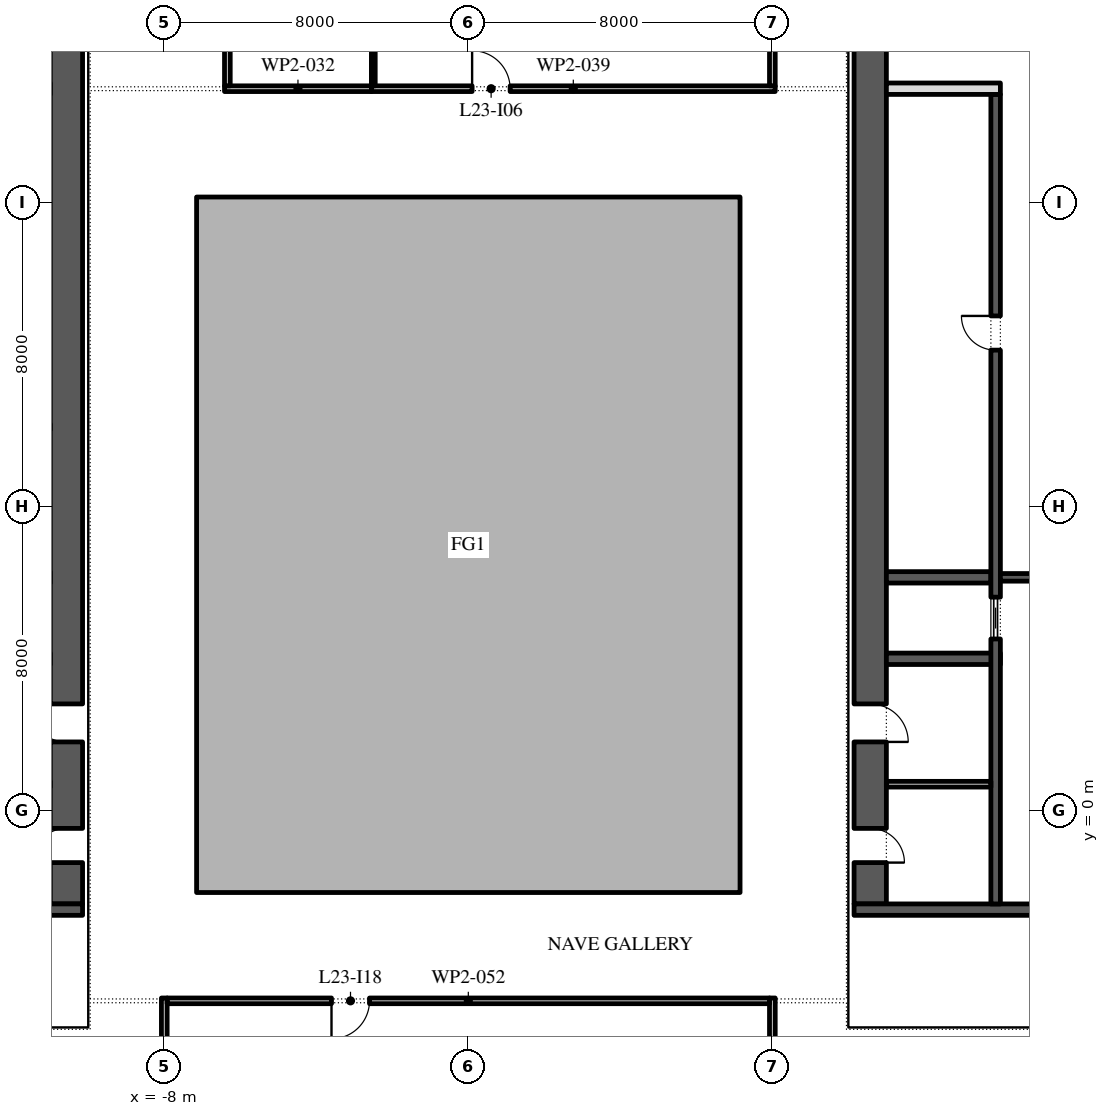
"""IFC4 building model, lengths in metres.
Left out: names, types, materials, properties, quantities, classifications, styles, units other than length and angle.
Written with IfcOpenShell. Run it as: python <this file> out.ifc"""

import sys

from ifc_helpers import new_model, si_unit, direction, frame, frame_2d, origin, place, context, subcontext, project, spatial, polyline, rectangle, outline, extrude, element, fill, save


model = new_model("IFC4")
c1 = context("Model", 3, precision=1e-05, world=origin(), true_north=direction((0.0, 1.0)))
c2 = subcontext(c1, "Body", "Model", "MODEL_VIEW")
j1 = project(units=[si_unit("LENGTHUNIT", "METRE"), si_unit("PLANEANGLEUNIT", "RADIAN")], contexts=[c1])
p1 = place(None, origin())
s1 = spatial("IfcSite", under=j1, at=p1, CompositionType="ELEMENT")
p2 = place(p1, origin())
s2 = spatial("IfcBuilding", under=s1, at=p2, CompositionType="ELEMENT")
p3 = place(p2, frame((0.0, 0.0, 109.8)))
s3 = spatial("IfcBuildingStorey", under=s2, at=p3, CompositionType="ELEMENT", Elevation=109.8)
p4 = place(p3, origin())
e1 = element("IfcWall", 1, at=p4, inside=s3, PredefinedType="STANDARD", context=c2, shape_type="SweptSolid", body=[
    extrude(outline(polyline([(-7.15, -2.15), (7.15, -2.15), (7.15, 16.15), (-7.15, 16.15), (-7.15, -2.15)]), holes=[polyline([(-7.0, -2.0), (-7.0, 16.0), (7.0, 16.0), (7.0, -2.0), (-7.0, -2.0)])]), origin(), (0.0, 0.0, 1.0), 4.0),
])
p5 = place(p3, frame((-10.575, -2.45, 0.0), z_axis=(0.0, 0.0, 1.0), x_axis=(0.0, 1.0, 0.0)))
e2 = element("IfcWall", 2, at=p5, inside=s3, PredefinedType="SHEAR", context=c2, shape_type="SweptSolid", body=[
    extrude(rectangle(XDim=27.9, YDim=0.85, at=frame_2d((13.95, 0.0))), origin(), (0.0, 0.0, 1.0), 4.0),
])
p6 = place(p5, frame((23.65, 0.0, 0.0)))
e3 = element("IfcOpeningElement", 3, at=p6, cuts=e2, PredefinedType="OPENING", context=c2, shape_type="SweptSolid", body=[
    extrude(rectangle(XDim=2.4, YDim=2.1, at=frame_2d((1.2, 1.05))), frame((0.0, 0.435, 0.0), z_axis=(0.0, -1.0, 0.0), x_axis=(1.0, 0.0, 0.0)), (0.0, 0.0, 1.0), 0.87),
])
p7 = place(p5, frame((1.087, 0.0, 0.0)))
e4 = element("IfcOpeningElement", 4, at=p7, cuts=e2, PredefinedType="OPENING", context=c2, shape_type="SweptSolid", body=[
    extrude(rectangle(XDim=0.9, YDim=2.1, at=frame_2d((0.45, 1.05))), frame((0.0, 0.435, 0.0), z_axis=(0.0, -1.0, 0.0), x_axis=(1.0, 0.0, 0.0)), (0.0, 0.0, 1.0), 0.87),
])
p8 = place(p5, frame((4.262, 0.0, 0.0)))
e5 = element("IfcOpeningElement", 5, at=p8, cuts=e2, PredefinedType="OPENING", context=c2, shape_type="SweptSolid", body=[
    extrude(rectangle(XDim=1.0, YDim=2.1, at=frame_2d((0.5, 1.05))), frame((0.0, 0.435, 0.0), z_axis=(0.0, -1.0, 0.0), x_axis=(1.0, 0.0, 0.0)), (0.0, 0.0, 1.0), 0.87),
])
p9 = place(p3, frame((-21.85, -2.6, 0.0), z_axis=(0.0, 0.0, 1.0), x_axis=(1.0, 0.0, 0.0)))
e6 = element("IfcWall", 6, at=p9, inside=s3, PredefinedType="SHEAR", context=c2, shape_type="SweptSolid", body=[
    extrude(rectangle(XDim=11.7, YDim=0.3, at=frame_2d((5.85, 0.0))), origin(), (0.0, 0.0, 1.0), 4.0),
])
p10 = place(p3, frame((10.575, -2.45, 0.0), z_axis=(0.0, 0.0, 1.0), x_axis=(0.0, 1.0, 0.0)))
e7 = element("IfcWall", 7, at=p10, inside=s3, PredefinedType="SHEAR", context=c2, shape_type="SweptSolid", body=[
    extrude(rectangle(XDim=27.9, YDim=0.85, at=frame_2d((13.95, 0.0))), origin(), (0.0, 0.0, 1.0), 4.0),
])
p11 = place(p10, frame((23.65, 0.0, 0.0)))
e8 = element("IfcOpeningElement", 8, at=p11, cuts=e7, PredefinedType="OPENING", context=c2, shape_type="SweptSolid", body=[
    extrude(rectangle(XDim=2.4, YDim=2.1, at=frame_2d((1.2, 1.05))), frame((0.0, 0.435, 0.0), z_axis=(0.0, -1.0, 0.0), x_axis=(1.0, 0.0, 0.0)), (0.0, 0.0, 1.0), 0.87),
])
p12 = place(p10, frame((1.087, 0.0, 0.0)))
e9 = element("IfcOpeningElement", 9, at=p12, cuts=e7, PredefinedType="OPENING", context=c2, shape_type="SweptSolid", body=[
    extrude(rectangle(XDim=0.9, YDim=2.1, at=frame_2d((0.45, 1.05))), frame((0.0, 0.435, 0.0), z_axis=(0.0, -1.0, 0.0), x_axis=(1.0, 0.0, 0.0)), (0.0, 0.0, 1.0), 0.87),
])
p13 = place(p10, frame((4.262, 0.0, 0.0)))
e10 = element("IfcOpeningElement", 10, at=p13, cuts=e7, PredefinedType="OPENING", context=c2, shape_type="SweptSolid", body=[
    extrude(rectangle(XDim=1.0, YDim=2.1, at=frame_2d((0.5, 1.05))), frame((0.0, 0.435, 0.0), z_axis=(0.0, -1.0, 0.0), x_axis=(1.0, 0.0, 0.0)), (0.0, 0.0, 1.0), 0.87),
])
p14 = place(p3, frame((10.15, -2.6, 0.0), z_axis=(0.0, 0.0, 1.0), x_axis=(1.0, 0.0, 0.0)))
e11 = element("IfcWall", 11, at=p14, inside=s3, PredefinedType="SHEAR", context=c2, shape_type="SweptSolid", body=[
    extrude(rectangle(XDim=11.7, YDim=0.3, at=frame_2d((5.85, 0.0))), origin(), (0.0, 0.0, 1.0), 4.0),
])
p15 = place(p3, frame((11.0, 4.0, 0.0), z_axis=(0.0, 0.0, 1.0), x_axis=(1.0, 0.0, 0.0)))
e12 = element("IfcWall", 12, at=p15, inside=s3, PredefinedType="SHEAR", context=c2, shape_type="SweptSolid", body=[
    extrude(rectangle(XDim=3.0, YDim=0.3, at=frame_2d((1.5, 0.0))), origin(), (0.0, 0.0, 1.0), 4.0),
])
p16 = place(p3, frame((11.0, 6.143, 0.0), z_axis=(0.0, 0.0, 1.0), x_axis=(1.0, 0.0, 0.0)))
e13 = element("IfcWall", 13, at=p16, inside=s3, PredefinedType="SHEAR", context=c2, shape_type="SweptSolid", body=[
    extrude(rectangle(XDim=2.75, YDim=0.3, at=frame_2d((1.375, 0.0))), origin(), (0.0, 0.0, 1.0), 4.0),
])
p17 = place(p3, frame((13.875, -2.45, 0.0), z_axis=(0.0, 0.0, 1.0), x_axis=(0.0, 1.0, 0.0)))
e14 = element("IfcWall", 14, at=p17, inside=s3, PredefinedType="SHEAR", context=c2, shape_type="SweptSolid", body=[
    extrude(rectangle(XDim=21.3, YDim=0.25, at=frame_2d((10.65, 0.0))), origin(), (0.0, 0.0, 1.0), 4.0),
])
p18 = place(p17, frame((14.571, 0.0, 0.0)))
e15 = element("IfcOpeningElement", 15, at=p18, cuts=e14, PredefinedType="OPENING", context=c2, shape_type="SweptSolid", body=[
    extrude(rectangle(XDim=0.9, YDim=2.1, at=frame_2d((0.45, 1.05))), frame((0.0, 0.135, 0.0), z_axis=(0.0, -1.0, 0.0), x_axis=(1.0, 0.0, 0.0)), (0.0, 0.0, 1.0), 0.27),
])
p19 = place(p17, frame((6.971, 0.0, 0.0)))
e16 = element("IfcOpeningElement", 16, at=p19, cuts=e14, PredefinedType="OPENING", context=c2, shape_type="SweptSolid", body=[
    extrude(rectangle(XDim=1.1, YDim=2.1, at=frame_2d((0.55, 1.05))), frame((0.0, 0.135, 0.0), z_axis=(0.0, -1.0, 0.0), x_axis=(1.0, 0.0, 0.0)), (0.0, 0.0, 1.0), 0.27),
])
p20 = place(p3, frame((11.0, 19.0, 0.0), z_axis=(0.0, 0.0, 1.0), x_axis=(1.0, 0.0, 0.0)))
e17 = element("IfcWall", 17, at=p20, inside=s3, PredefinedType="PARTITIONING", context=c2, shape_type="SweptSolid", body=[
    extrude(rectangle(XDim=3.0, YDim=0.3, at=frame_2d((1.5, 0.0))), origin(), (0.0, 0.0, 1.0), 4.0),
])
p21 = place(p3, frame((14.0, 6.143, 0.0), z_axis=(0.0, 0.0, 1.0), x_axis=(1.0, 0.0, 0.0)))
e18 = element("IfcWall", 18, at=p21, inside=s3, PredefinedType="SHEAR", context=c2, shape_type="SweptSolid", body=[
    extrude(rectangle(XDim=4.0, YDim=0.2, at=frame_2d((2.0, 0.0))), origin(), (0.0, 0.0, 1.0), 4.0),
])
p22 = place(p21, frame((1.4, 0.0, 0.0)))
e19 = element("IfcOpeningElement", 19, at=p22, cuts=e18, PredefinedType="OPENING", context=c2, shape_type="SweptSolid", body=[
    extrude(rectangle(XDim=1.2, YDim=2.1, at=frame_2d((0.6, 1.05))), frame((0.0, 0.11, 0.0), z_axis=(0.0, -1.0, 0.0), x_axis=(1.0, 0.0, 0.0)), (0.0, 0.0, 1.0), 0.22),
])
p23 = place(p3, frame((11.0, 0.7, 0.0), z_axis=(0.0, 0.0, 1.0), x_axis=(1.0, 0.0, 0.0)))
e20 = element("IfcWall", 20, at=p23, inside=s3, PredefinedType="PARTITIONING", context=c2, shape_type="SweptSolid", body=[
    extrude(rectangle(XDim=2.75, YDim=0.15, at=frame_2d((1.375, 0.0))), origin(), (0.0, 0.0, 1.0), 4.0),
])
p24 = place(p3, frame((-8.0, -4.925, 0.0), z_axis=(0.0, 0.0, 1.0), x_axis=(0.0, -1.0, 0.0)))
e21 = element("IfcWall", 21, at=p24, inside=s3, PredefinedType="PARTITIONING", context=c2, shape_type="SweptSolid", body=[
    extrude(rectangle(XDim=2.7, YDim=0.15, at=frame_2d((1.35, 0.0))), origin(), (0.0, 0.0, 1.0), 4.0),
])
p25 = place(p3, frame((-6.415, 19.0, 0.0), z_axis=(0.0, 0.0, 1.0), x_axis=(1.0, 0.0, 0.0)))
e22 = element("IfcWall", 22, at=p25, inside=s3, PredefinedType="PARTITIONING", context=c2, shape_type="SweptSolid", body=[
    extrude(rectangle(XDim=3.865, YDim=0.15, at=frame_2d((1.933, 0.0))), origin(), (0.0, 0.0, 1.0), 4.0),
])
p26 = place(p3, frame((-6.34, 25.05, 0.0), z_axis=(0.0, 0.0, 1.0), x_axis=(0.0, -1.0, 0.0)))
e23 = element("IfcWall", 23, at=p26, inside=s3, PredefinedType="PARTITIONING", context=c2, shape_type="SweptSolid", body=[
    extrude(rectangle(XDim=5.975, YDim=0.15, at=frame_2d((2.988, 0.0))), origin(), (0.0, 0.0, 1.0), 4.0),
])
p27 = place(p26, frame((2.65, 0.0, 0.0)))
e24 = element("IfcOpeningElement", 24, at=p27, cuts=e23, PredefinedType="OPENING", context=c2, shape_type="SweptSolid", body=[
    extrude(rectangle(XDim=1.0, YDim=2.1, at=frame_2d((0.5, 1.05))), frame((0.0, 0.085, 0.0), z_axis=(0.0, -1.0, 0.0), x_axis=(1.0, 0.0, 0.0)), (0.0, 0.0, 1.0), 0.17),
])
p28 = place(p3, frame((-2.55, 19.0, 0.0), z_axis=(0.0, 0.0, 1.0), x_axis=(1.0, 0.0, 0.0)))
e25 = element("IfcWall", 25, at=p28, inside=s3, PredefinedType="PARTITIONING", context=c2, shape_type="SweptSolid", body=[
    extrude(rectangle(XDim=10.625, YDim=0.15, at=frame_2d((5.312, 0.0))), origin(), (0.0, 0.0, 1.0), 4.0),
])
p29 = place(p28, frame((2.65, 0.0, 0.0)))
e26 = element("IfcOpeningElement", 26, at=p29, cuts=e25, PredefinedType="OPENING", context=c2, shape_type="SweptSolid", body=[
    extrude(rectangle(XDim=1.0, YDim=2.1, at=frame_2d((0.5, 1.05))), frame((0.0, 0.085, 0.0), z_axis=(0.0, -1.0, 0.0), x_axis=(1.0, 0.0, 0.0)), (0.0, 0.0, 1.0), 0.17),
])
p30 = place(p3, frame((-2.5, 24.95, 0.0), z_axis=(0.0, 0.0, 1.0), x_axis=(0.0, -1.0, 0.0)))
e27 = element("IfcWall", 27, at=p30, inside=s3, PredefinedType="PARTITIONING", context=c2, shape_type="SweptSolid", body=[
    extrude(rectangle(XDim=5.875, YDim=0.1, at=frame_2d((2.938, 0.0))), origin(), (0.0, 0.0, 1.0), 4.0),
])
p31 = place(p3, frame((8.0, -7.775, 0.0), z_axis=(0.0, 0.0, 1.0), x_axis=(0.0, 1.0, 0.0)))
e28 = element("IfcWall", 28, at=p31, inside=s3, PredefinedType="PARTITIONING", context=c2, shape_type="SweptSolid", body=[
    extrude(rectangle(XDim=2.85, YDim=0.15, at=frame_2d((1.425, 0.0))), origin(), (0.0, 0.0, 1.0), 4.0),
])
p32 = place(p3, frame((7.925, -5.0, 0.0), z_axis=(0.0, 0.0, 1.0), x_axis=(-1.0, 0.0, 0.0)))
e29 = element("IfcWall", 29, at=p32, inside=s3, PredefinedType="PARTITIONING", context=c2, shape_type="SweptSolid", body=[
    extrude(rectangle(XDim=15.85, YDim=0.15, at=frame_2d((7.925, 0.0))), origin(), (0.0, 0.0, 1.0), 4.0),
])
p33 = place(p32, frame((10.525, 0.0, 0.0)))
e30 = element("IfcOpeningElement", 30, at=p33, cuts=e29, PredefinedType="OPENING", context=c2, shape_type="SweptSolid", body=[
    extrude(rectangle(XDim=1.0, YDim=2.1, at=frame_2d((0.5, 1.05))), frame((0.0, 0.085, 0.0), z_axis=(0.0, -1.0, 0.0), x_axis=(1.0, 0.0, 0.0)), (0.0, 0.0, 1.0), 0.17),
])
p34 = place(p3, frame((8.0, 19.075, 0.0), z_axis=(0.0, 0.0, 1.0), x_axis=(0.0, 1.0, 0.0)))
e31 = element("IfcWall", 31, at=p34, inside=s3, PredefinedType="PARTITIONING", context=c2, shape_type="SweptSolid", body=[
    extrude(rectangle(XDim=5.875, YDim=0.15, at=frame_2d((2.938, 0.0))), origin(), (0.0, 0.0, 1.0), 4.0),
])
p35 = place(p7, origin())
e32 = element("IfcDoor", 32, at=p35, inside=s3, OperationType="SINGLE_SWING_RIGHT", PredefinedType="DOOR", context=c2, shape_type="SweptSolid", body=[
    extrude(rectangle(XDim=0.9, YDim=2.1, at=frame_2d((0.45, 1.05))), frame((0.0, 0.425, 0.0), z_axis=(0.0, -1.0, 0.0), x_axis=(1.0, 0.0, 0.0)), (0.0, 0.0, 1.0), 0.05),
])
fill(e4, e32)
p36 = place(p8, origin())
e33 = element("IfcDoor", 33, at=p36, inside=s3, OperationType="SINGLE_SWING_LEFT", PredefinedType="DOOR", context=c2, shape_type="SweptSolid", body=[
    extrude(rectangle(XDim=1.0, YDim=2.1, at=frame_2d((0.5, 1.05))), frame((0.0, 0.425, 0.0), z_axis=(0.0, -1.0, 0.0), x_axis=(1.0, 0.0, 0.0)), (0.0, 0.0, 1.0), 0.05),
])
fill(e5, e33)
p37 = place(p18, origin())
e34 = element("IfcDoor", 34, at=p37, inside=s3, OperationType="SINGLE_SWING_LEFT", PredefinedType="DOOR", context=c2, shape_type="SweptSolid", body=[
    extrude(rectangle(XDim=0.9, YDim=2.1, at=frame_2d((0.45, 1.05))), frame((0.0, 0.125, 0.0), z_axis=(0.0, -1.0, 0.0), x_axis=(1.0, 0.0, 0.0)), (0.0, 0.0, 1.0), 0.05),
])
fill(e15, e34)
p38 = place(p19, origin())
e35 = element("IfcDoor", 35, at=p38, inside=s3, OperationType="SLIDING_TO_LEFT", PredefinedType="DOOR", context=c2, shape_type="SweptSolid", body=[
    extrude(rectangle(XDim=1.1, YDim=2.1, at=frame_2d((0.55, 1.05))), frame((0.0, 0.025, 0.0), z_axis=(0.0, -1.0, 0.0), x_axis=(1.0, 0.0, 0.0)), (0.0, 0.0, 1.0), 0.05),
])
fill(e16, e35)
p39 = place(p12, frame((0.9, -0.8, 0.0), z_axis=(0.0, 0.0, 1.0), x_axis=(-1.0, 0.0, 0.0)))
e36 = element("IfcDoor", 36, at=p39, inside=s3, OperationType="SINGLE_SWING_LEFT", PredefinedType="DOOR", context=c2, shape_type="SweptSolid", body=[
    extrude(rectangle(XDim=0.9, YDim=2.1, at=frame_2d((0.45, 1.05))), frame((0.0, -0.375, 0.0), z_axis=(0.0, -1.0, 0.0), x_axis=(1.0, 0.0, 0.0)), (0.0, 0.0, 1.0), 0.05),
])
fill(e9, e36)
p40 = place(p13, frame((1.0, -0.8, 0.0), z_axis=(0.0, 0.0, 1.0), x_axis=(-1.0, 0.0, 0.0)))
e37 = element("IfcDoor", 37, at=p40, inside=s3, OperationType="SINGLE_SWING_LEFT", PredefinedType="DOOR", context=c2, shape_type="SweptSolid", body=[
    extrude(rectangle(XDim=1.0, YDim=2.1, at=frame_2d((0.5, 1.05))), frame((0.0, -0.375, 0.0), z_axis=(0.0, -1.0, 0.0), x_axis=(1.0, 0.0, 0.0)), (0.0, 0.0, 1.0), 0.05),
])
fill(e10, e37)
p41 = place(p29, origin())
e38 = element("IfcDoor", 38, at=p41, inside=s3, OperationType="SINGLE_SWING_RIGHT", PredefinedType="DOOR", context=c2, shape_type="SweptSolid", body=[
    extrude(rectangle(XDim=1.0, YDim=2.1, at=frame_2d((0.5, 1.05))), frame((0.0, 0.025, 0.0), z_axis=(0.0, -1.0, 0.0), x_axis=(1.0, 0.0, 0.0)), (0.0, 0.0, 1.0), 0.05),
])
fill(e26, e38)
p42 = place(p33, origin())
e39 = element("IfcDoor", 39, at=p42, inside=s3, OperationType="SINGLE_SWING_LEFT", PredefinedType="DOOR", context=c2, shape_type="SweptSolid", body=[
    extrude(rectangle(XDim=1.0, YDim=2.1, at=frame_2d((0.5, 1.05))), frame((0.0, 0.025, 0.0), z_axis=(0.0, -1.0, 0.0), x_axis=(1.0, 0.0, 0.0)), (0.0, 0.0, 1.0), 0.05),
])
fill(e30, e39)
save(model, sys.argv[1])
